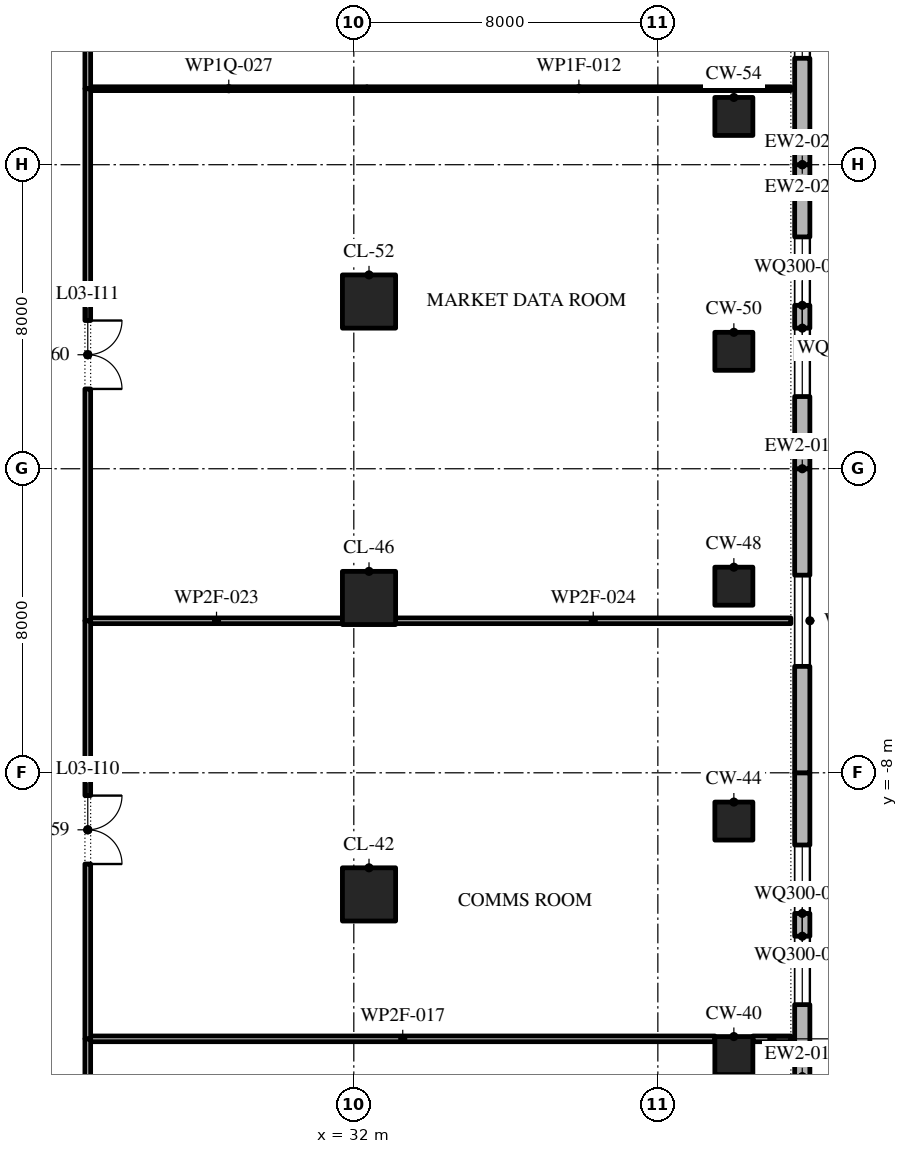
"""IFC4 building model, lengths in metres.
Left out: names, types, materials, properties, quantities, classifications, styles, units other than length and angle.
Written with IfcOpenShell. Run it as: python <this file> out.ifc"""

import sys

from ifc_helpers import new_model, si_unit, direction, frame, frame_2d, origin, origin_2d, place, context, subcontext, project, spatial, polyline, rectangle, outline, extrude, element, fill, save


model = new_model("IFC4")
c1 = context("Model", 3, precision=1e-05, world=origin(), true_north=direction((0.0, 1.0)))
c2 = subcontext(c1, "Body", "Model", "MODEL_VIEW")
j1 = project(units=[si_unit("LENGTHUNIT", "METRE"), si_unit("PLANEANGLEUNIT", "RADIAN")], contexts=[c1])
p1 = place(None, origin())
s1 = spatial("IfcSite", under=j1, at=p1, CompositionType="ELEMENT")
p2 = place(p1, origin())
s2 = spatial("IfcBuilding", under=s1, at=p2, CompositionType="ELEMENT")
p3 = place(p2, frame((0.0, 0.0, 19.2)))
s3 = spatial("IfcBuildingStorey", under=s2, at=p3, CompositionType="ELEMENT", Elevation=19.2)
p4 = place(p3, frame((42.0, -15.44, 0.0), z_axis=(0.0, 0.0, 1.0), x_axis=(1.0, 0.0, 0.0)))
e1 = element("IfcColumn", 1, at=p4, inside=s3, PredefinedType="COLUMN", context=c2, shape_type="SweptSolid", body=[
    extrude(rectangle(XDim=1.0, YDim=1.0, at=origin_2d()), origin(), (0.0, 0.0, 1.0), 4.8),
])
p5 = place(p3, frame((32.4, -11.2, 0.0), z_axis=(0.0, 0.0, 1.0), x_axis=(1.0, 0.0, 0.0)))
e2 = element("IfcColumn", 2, at=p5, inside=s3, PredefinedType="COLUMN", context=c2, shape_type="SweptSolid", body=[
    extrude(rectangle(XDim=1.4, YDim=1.4, at=origin_2d()), origin(), (0.0, 0.0, 1.0), 4.8),
])
p6 = place(p3, frame((42.0, -9.27, 0.0), z_axis=(0.0, 0.0, 1.0), x_axis=(1.0, 0.0, 0.0)))
e3 = element("IfcColumn", 3, at=p6, inside=s3, PredefinedType="COLUMN", context=c2, shape_type="SweptSolid", body=[
    extrude(rectangle(XDim=1.0, YDim=1.0, at=origin_2d()), origin(), (0.0, 0.0, 1.0), 4.8),
])
p7 = place(p3, frame((32.4, -3.4, 0.0), z_axis=(0.0, 0.0, 1.0), x_axis=(1.0, 0.0, 0.0)))
e4 = element("IfcColumn", 4, at=p7, inside=s3, PredefinedType="COLUMN", context=c2, shape_type="SweptSolid", body=[
    extrude(rectangle(XDim=1.4, YDim=1.4, at=origin_2d()), origin(), (0.0, 0.0, 1.0), 4.8),
])
for number, where, z_axis, x_axis in (
    (5, (42.0, -3.09, 0.0), (0.0, 0.0, 1.0), (1.0, 0.0, 0.0)),
    (6, (42.0, 3.09, 0.0), (0.0, 0.0, 1.0), (1.0, 0.0, 0.0)),
):
    element("IfcColumn", number, at=place(p3, frame(where, z_axis=z_axis, x_axis=x_axis)), inside=s3, PredefinedType="COLUMN", context=c2, shape_type="SweptSolid", body=[
        extrude(rectangle(XDim=1.0, YDim=1.0, at=origin_2d()), origin(), (0.0, 0.0, 1.0), 4.8),
    ])
p8 = place(p3, frame((32.4, 4.4, 0.0), z_axis=(0.0, 0.0, 1.0), x_axis=(1.0, 0.0, 0.0)))
e7 = element("IfcColumn", 7, at=p8, inside=s3, PredefinedType="COLUMN", context=c2, shape_type="SweptSolid", body=[
    extrude(rectangle(XDim=1.4, YDim=1.4, at=origin_2d()), origin(), (0.0, 0.0, 1.0), 4.8),
])
p9 = place(p3, frame((42.0, 9.27, 0.0), z_axis=(0.0, 0.0, 1.0), x_axis=(1.0, 0.0, 0.0)))
e8 = element("IfcColumn", 8, at=p9, inside=s3, PredefinedType="COLUMN", context=c2, shape_type="SweptSolid", body=[
    extrude(rectangle(XDim=1.0, YDim=1.0, at=origin_2d()), origin(), (0.0, 0.0, 1.0), 4.8),
])
p10 = place(p3, frame((43.8, -16.0, 0.0), z_axis=(0.0, 0.0, 1.0), x_axis=(0.0, 1.0, 0.0)))
e9 = element("IfcWall", 9, at=p10, inside=s3, PredefinedType="STANDARD", context=c2, shape_type="SweptSolid", body=[
    extrude(rectangle(XDim=8.0, YDim=0.4, at=frame_2d((4.0, 0.0))), origin(), (0.0, 0.0, 1.0), 4.5),
])
p11 = place(p10, frame((1.9, 0.0, 0.9)))
e10 = element("IfcOpeningElement", 10, at=p11, cuts=e9, PredefinedType="OPENING", context=c2, shape_type="SweptSolid", body=[
    extrude(outline(polyline([(0.0, 0.0), (1.8, 0.0), (1.8, 1.5), (1.785, 1.729), (1.738, 1.954), (1.662, 2.17), (1.558, 2.375), (1.427, 2.563), (1.271, 2.732), (1.095, 2.879), (0.9, 3.0), (0.705, 2.879), (0.529, 2.732), (0.373, 2.563), (0.242, 2.375), (0.138, 2.17), (0.062, 1.954), (0.015, 1.729), (0.0, 1.5), (0.0, 0.0)])), frame((0.0, 0.21, 0.0), z_axis=(0.0, -1.0, 0.0), x_axis=(1.0, 0.0, 0.0)), (0.0, 0.0, 1.0), 0.42),
])
p12 = place(p10, frame((4.3, 0.0, 0.9)))
e11 = element("IfcOpeningElement", 11, at=p12, cuts=e9, PredefinedType="OPENING", context=c2, shape_type="SweptSolid", body=[
    extrude(outline(polyline([(0.0, 0.0), (1.8, 0.0), (1.8, 1.5), (1.785, 1.729), (1.738, 1.954), (1.662, 2.17), (1.558, 2.375), (1.427, 2.563), (1.271, 2.732), (1.095, 2.879), (0.9, 3.0), (0.705, 2.879), (0.529, 2.732), (0.373, 2.563), (0.242, 2.375), (0.138, 2.17), (0.062, 1.954), (0.015, 1.729), (0.0, 1.5), (0.0, 0.0)])), frame((0.0, 0.21, 0.0), z_axis=(0.0, -1.0, 0.0), x_axis=(1.0, 0.0, 0.0)), (0.0, 0.0, 1.0), 0.42),
])
p13 = place(p3, frame((43.8, -8.0, 0.0), z_axis=(0.0, 0.0, 1.0), x_axis=(0.0, 1.0, 0.0)))
e12 = element("IfcWall", 12, at=p13, inside=s3, PredefinedType="STANDARD", context=c2, shape_type="SweptSolid", body=[
    extrude(rectangle(XDim=8.0, YDim=0.4, at=frame_2d((4.0, 0.0))), origin(), (0.0, 0.0, 1.0), 4.5),
])
p14 = place(p13, frame((2.8, 0.0, 0.9)))
e13 = element("IfcOpeningElement", 13, at=p14, cuts=e12, PredefinedType="OPENING", context=c2, shape_type="SweptSolid", body=[
    extrude(outline(polyline([(0.0, 0.0), (2.4, 0.0), (2.4, 1.5), (2.378, 1.758), (2.313, 2.009), (2.207, 2.245), (2.063, 2.46), (1.885, 2.648), (1.677, 2.804), (1.447, 2.922), (1.2, 3.0), (0.953, 2.922), (0.722, 2.804), (0.515, 2.648), (0.337, 2.46), (0.193, 2.245), (0.087, 2.009), (0.022, 1.758), (0.0, 1.5), (0.0, 0.0)])), frame((0.0, 0.21, 0.0), z_axis=(0.0, -1.0, 0.0), x_axis=(1.0, 0.0, 0.0)), (0.0, 0.0, 1.0), 0.42),
])
p15 = place(p3, frame((43.8, 0.0, 0.0), z_axis=(0.0, 0.0, 1.0), x_axis=(0.0, 1.0, 0.0)))
e14 = element("IfcWall", 14, at=p15, inside=s3, PredefinedType="STANDARD", context=c2, shape_type="SweptSolid", body=[
    extrude(rectangle(XDim=8.0, YDim=0.4, at=frame_2d((4.0, 0.0))), origin(), (0.0, 0.0, 1.0), 4.5),
])
p16 = place(p15, frame((1.9, 0.0, 0.9)))
e15 = element("IfcOpeningElement", 15, at=p16, cuts=e14, PredefinedType="OPENING", context=c2, shape_type="SweptSolid", body=[
    extrude(outline(polyline([(0.0, 0.0), (1.8, 0.0), (1.8, 1.5), (1.785, 1.729), (1.738, 1.954), (1.662, 2.17), (1.558, 2.375), (1.427, 2.563), (1.271, 2.732), (1.095, 2.879), (0.9, 3.0), (0.705, 2.879), (0.529, 2.732), (0.373, 2.563), (0.242, 2.375), (0.138, 2.17), (0.062, 1.954), (0.015, 1.729), (0.0, 1.5), (0.0, 0.0)])), frame((0.0, 0.21, 0.0), z_axis=(0.0, -1.0, 0.0), x_axis=(1.0, 0.0, 0.0)), (0.0, 0.0, 1.0), 0.42),
])
p17 = place(p15, frame((4.3, 0.0, 0.9)))
e16 = element("IfcOpeningElement", 16, at=p17, cuts=e14, PredefinedType="OPENING", context=c2, shape_type="SweptSolid", body=[
    extrude(outline(polyline([(0.0, 0.0), (1.8, 0.0), (1.8, 1.5), (1.785, 1.729), (1.738, 1.954), (1.662, 2.17), (1.558, 2.375), (1.427, 2.563), (1.271, 2.732), (1.095, 2.879), (0.9, 3.0), (0.705, 2.879), (0.529, 2.732), (0.373, 2.563), (0.242, 2.375), (0.138, 2.17), (0.062, 1.954), (0.015, 1.729), (0.0, 1.5), (0.0, 0.0)])), frame((0.0, 0.21, 0.0), z_axis=(0.0, -1.0, 0.0), x_axis=(1.0, 0.0, 0.0)), (0.0, 0.0, 1.0), 0.42),
])
p18 = place(p3, frame((43.8, 8.0, 0.0), z_axis=(0.0, 0.0, 1.0), x_axis=(0.0, 1.0, 0.0)))
e17 = element("IfcWall", 17, at=p18, inside=s3, PredefinedType="STANDARD", context=c2, shape_type="SweptSolid", body=[
    extrude(rectangle(XDim=8.0, YDim=0.4, at=frame_2d((4.0, 0.0))), origin(), (0.0, 0.0, 1.0), 4.5),
])
p19 = place(p18, frame((2.8, 0.0, 0.9)))
e18 = element("IfcOpeningElement", 18, at=p19, cuts=e17, PredefinedType="OPENING", context=c2, shape_type="SweptSolid", body=[
    extrude(outline(polyline([(0.0, 0.0), (2.4, 0.0), (2.4, 1.5), (2.378, 1.758), (2.313, 2.009), (2.207, 2.245), (2.063, 2.46), (1.885, 2.648), (1.677, 2.804), (1.447, 2.922), (1.2, 3.0), (0.953, 2.922), (0.722, 2.804), (0.515, 2.648), (0.337, 2.46), (0.193, 2.245), (0.087, 2.009), (0.022, 1.758), (0.0, 1.5), (0.0, 0.0)])), frame((0.0, 0.21, 0.0), z_axis=(0.0, -1.0, 0.0), x_axis=(1.0, 0.0, 0.0)), (0.0, 0.0, 1.0), 0.42),
])
p20 = place(p3, frame((25.075, -15.0, 0.0), z_axis=(0.0, 0.0, 1.0), x_axis=(1.0, 0.0, 0.0)))
e19 = element("IfcWall", 19, at=p20, inside=s3, PredefinedType="PARTITIONING", context=c2, shape_type="SweptSolid", body=[
    extrude(rectangle(XDim=16.425, YDim=0.15, at=frame_2d((8.212, 0.0))), origin(), (0.0, 0.0, 1.0), 4.5),
])
p21 = place(p3, frame((42.5, -15.0, 0.0), z_axis=(0.0, 0.0, 1.0), x_axis=(1.0, 0.0, 0.0)))
e20 = element("IfcWall", 20, at=p21, inside=s3, PredefinedType="PARTITIONING", context=c2, shape_type="SweptSolid", body=[
    extrude(rectangle(XDim=1.0, YDim=0.15, at=frame_2d((0.5, 0.0))), origin(), (0.0, 0.0, 1.0), 4.5),
])
p22 = place(p3, frame((25.075, -4.0, 0.0), z_axis=(0.0, 0.0, 1.0), x_axis=(1.0, 0.0, 0.0)))
e21 = element("IfcWall", 21, at=p22, inside=s3, PredefinedType="PARTITIONING", context=c2, shape_type="SweptSolid", body=[
    extrude(rectangle(XDim=6.625, YDim=0.15, at=frame_2d((3.312, 0.0))), origin(), (0.0, 0.0, 1.0), 4.5),
])
p23 = place(p3, frame((33.1, -4.0, 0.0), z_axis=(0.0, 0.0, 1.0), x_axis=(1.0, 0.0, 0.0)))
e22 = element("IfcWall", 22, at=p23, inside=s3, PredefinedType="PARTITIONING", context=c2, shape_type="SweptSolid", body=[
    extrude(rectangle(XDim=10.4, YDim=0.15, at=frame_2d((5.2, 0.0))), origin(), (0.0, 0.0, 1.0), 4.5),
])
p24 = place(p3, frame((25.075, 10.0, 0.0), z_axis=(0.0, 0.0, 1.0), x_axis=(1.0, 0.0, 0.0)))
e23 = element("IfcWall", 23, at=p24, inside=s3, PredefinedType="PARTITIONING", context=c2, shape_type="SweptSolid", body=[
    extrude(rectangle(XDim=7.27, YDim=0.1, at=frame_2d((3.635, 0.0))), origin(), (0.0, 0.0, 1.0), 3.964),
])
p25 = place(p3, frame((25.0, -28.575, 0.0), z_axis=(0.0, 0.0, 1.0), x_axis=(0.0, 1.0, 0.0)))
e24 = element("IfcWall", 24, at=p25, inside=s3, PredefinedType="PARTITIONING", context=c2, shape_type="SweptSolid", body=[
    extrude(rectangle(XDim=13.575, YDim=0.15, at=frame_2d((6.788, 0.0))), origin(), (0.0, 0.0, 1.0), 4.5),
])
p26 = place(p25, frame((5.887, 0.0, 0.0)))
e25 = element("IfcOpeningElement", 25, at=p26, cuts=e24, PredefinedType="OPENING", context=c2, shape_type="SweptSolid", body=[
    extrude(rectangle(XDim=1.8, YDim=2.1, at=frame_2d((0.9, 1.05))), frame((0.0, 0.085, 0.0), z_axis=(0.0, -1.0, 0.0), x_axis=(1.0, 0.0, 0.0)), (0.0, 0.0, 1.0), 0.17),
])
p27 = place(p3, frame((25.0, -15.0, 0.0), z_axis=(0.0, 0.0, 1.0), x_axis=(0.0, 1.0, 0.0)))
e26 = element("IfcWall", 26, at=p27, inside=s3, PredefinedType="PARTITIONING", context=c2, shape_type="SweptSolid", body=[
    extrude(rectangle(XDim=11.0, YDim=0.15, at=frame_2d((5.5, 0.0))), origin(), (0.0, 0.0, 1.0), 4.5),
])
p28 = place(p27, frame((4.6, 0.0, 0.0)))
e27 = element("IfcOpeningElement", 27, at=p28, cuts=e26, PredefinedType="OPENING", context=c2, shape_type="SweptSolid", body=[
    extrude(rectangle(XDim=1.8, YDim=2.1, at=frame_2d((0.9, 1.05))), frame((0.0, 0.085, 0.0), z_axis=(0.0, -1.0, 0.0), x_axis=(1.0, 0.0, 0.0)), (0.0, 0.0, 1.0), 0.17),
])
p29 = place(p3, frame((25.0, -4.0, 0.0), z_axis=(0.0, 0.0, 1.0), x_axis=(0.0, 1.0, 0.0)))
e28 = element("IfcWall", 28, at=p29, inside=s3, PredefinedType="PARTITIONING", context=c2, shape_type="SweptSolid", body=[
    extrude(rectangle(XDim=14.0, YDim=0.15, at=frame_2d((7.0, 0.0))), origin(), (0.0, 0.0, 1.0), 4.5),
])
p30 = place(p29, frame((6.1, 0.0, 0.0)))
e29 = element("IfcOpeningElement", 29, at=p30, cuts=e28, PredefinedType="OPENING", context=c2, shape_type="SweptSolid", body=[
    extrude(rectangle(XDim=1.8, YDim=2.1, at=frame_2d((0.9, 1.05))), frame((0.0, 0.085, 0.0), z_axis=(0.0, -1.0, 0.0), x_axis=(1.0, 0.0, 0.0)), (0.0, 0.0, 1.0), 0.17),
])
p31 = place(p3, frame((25.0, 10.0, 0.0), z_axis=(0.0, 0.0, 1.0), x_axis=(0.0, 1.0, 0.0)))
e30 = element("IfcWall", 30, at=p31, inside=s3, PredefinedType="PARTITIONING", context=c2, shape_type="SweptSolid", body=[
    extrude(rectangle(XDim=12.0, YDim=0.15, at=frame_2d((6.0, 0.0))), origin(), (0.0, 0.0, 1.0), 4.5),
])
p32 = place(p31, frame((5.1, 0.0, 0.0)))
e31 = element("IfcOpeningElement", 31, at=p32, cuts=e30, PredefinedType="OPENING", context=c2, shape_type="SweptSolid", body=[
    extrude(rectangle(XDim=1.8, YDim=2.1, at=frame_2d((0.9, 1.05))), frame((0.0, 0.085, 0.0), z_axis=(0.0, -1.0, 0.0), x_axis=(1.0, 0.0, 0.0)), (0.0, 0.0, 1.0), 0.17),
])
p33 = place(p3, frame((32.345, 10.0, 0.0), z_axis=(0.0, 0.0, 1.0), x_axis=(1.0, 0.0, 0.0)))
e32 = element("IfcWall", 32, at=p33, inside=s3, PredefinedType="PARTITIONING", context=c2, shape_type="SweptSolid", body=[
    extrude(rectangle(XDim=11.155, YDim=0.1, at=frame_2d((5.578, 0.0))), origin(), (0.0, 0.0, 1.0), 4.5),
])
p34 = place(p11, origin())
e33 = element("IfcWindow", 33, at=p34, inside=s3, PartitioningType="DOUBLE_PANEL_VERTICAL", PredefinedType="WINDOW", context=c2, shape_type="SweptSolid", body=[
    extrude(outline(polyline([(0.0, 0.0), (1.8, 0.0), (1.8, 1.5), (1.785, 1.729), (1.738, 1.954), (1.662, 2.17), (1.558, 2.375), (1.427, 2.563), (1.271, 2.732), (1.095, 2.879), (0.9, 3.0), (0.705, 2.879), (0.529, 2.732), (0.373, 2.563), (0.242, 2.375), (0.138, 2.17), (0.062, 1.954), (0.015, 1.729), (0.0, 1.5), (0.0, 0.0)])), frame((0.0, 0.03, 0.0), z_axis=(0.0, -1.0, 0.0), x_axis=(1.0, 0.0, 0.0)), (0.0, 0.0, 1.0), 0.06),
])
fill(e10, e33)
p35 = place(p12, origin())
e34 = element("IfcWindow", 34, at=p35, inside=s3, PartitioningType="DOUBLE_PANEL_VERTICAL", PredefinedType="WINDOW", context=c2, shape_type="SweptSolid", body=[
    extrude(outline(polyline([(0.0, 0.0), (1.8, 0.0), (1.8, 1.5), (1.785, 1.729), (1.738, 1.954), (1.662, 2.17), (1.558, 2.375), (1.427, 2.563), (1.271, 2.732), (1.095, 2.879), (0.9, 3.0), (0.705, 2.879), (0.529, 2.732), (0.373, 2.563), (0.242, 2.375), (0.138, 2.17), (0.062, 1.954), (0.015, 1.729), (0.0, 1.5), (0.0, 0.0)])), frame((0.0, 0.03, 0.0), z_axis=(0.0, -1.0, 0.0), x_axis=(1.0, 0.0, 0.0)), (0.0, 0.0, 1.0), 0.06),
])
fill(e11, e34)
p36 = place(p14, origin())
e35 = element("IfcWindow", 35, at=p36, inside=s3, PartitioningType="DOUBLE_PANEL_VERTICAL", PredefinedType="WINDOW", context=c2, shape_type="SweptSolid", body=[
    extrude(outline(polyline([(0.0, 0.0), (2.4, 0.0), (2.4, 1.5), (2.378, 1.758), (2.313, 2.009), (2.207, 2.245), (2.063, 2.46), (1.885, 2.648), (1.677, 2.804), (1.447, 2.922), (1.2, 3.0), (0.953, 2.922), (0.722, 2.804), (0.515, 2.648), (0.337, 2.46), (0.193, 2.245), (0.087, 2.009), (0.022, 1.758), (0.0, 1.5), (0.0, 0.0)])), frame((0.0, 0.03, 0.0), z_axis=(0.0, -1.0, 0.0), x_axis=(1.0, 0.0, 0.0)), (0.0, 0.0, 1.0), 0.06),
])
fill(e13, e35)
p37 = place(p16, origin())
e36 = element("IfcWindow", 36, at=p37, inside=s3, PartitioningType="DOUBLE_PANEL_VERTICAL", PredefinedType="WINDOW", context=c2, shape_type="SweptSolid", body=[
    extrude(outline(polyline([(0.0, 0.0), (1.8, 0.0), (1.8, 1.5), (1.785, 1.729), (1.738, 1.954), (1.662, 2.17), (1.558, 2.375), (1.427, 2.563), (1.271, 2.732), (1.095, 2.879), (0.9, 3.0), (0.705, 2.879), (0.529, 2.732), (0.373, 2.563), (0.242, 2.375), (0.138, 2.17), (0.062, 1.954), (0.015, 1.729), (0.0, 1.5), (0.0, 0.0)])), frame((0.0, 0.03, 0.0), z_axis=(0.0, -1.0, 0.0), x_axis=(1.0, 0.0, 0.0)), (0.0, 0.0, 1.0), 0.06),
])
fill(e15, e36)
p38 = place(p17, origin())
e37 = element("IfcWindow", 37, at=p38, inside=s3, PartitioningType="DOUBLE_PANEL_VERTICAL", PredefinedType="WINDOW", context=c2, shape_type="SweptSolid", body=[
    extrude(outline(polyline([(0.0, 0.0), (1.8, 0.0), (1.8, 1.5), (1.785, 1.729), (1.738, 1.954), (1.662, 2.17), (1.558, 2.375), (1.427, 2.563), (1.271, 2.732), (1.095, 2.879), (0.9, 3.0), (0.705, 2.879), (0.529, 2.732), (0.373, 2.563), (0.242, 2.375), (0.138, 2.17), (0.062, 1.954), (0.015, 1.729), (0.0, 1.5), (0.0, 0.0)])), frame((0.0, 0.03, 0.0), z_axis=(0.0, -1.0, 0.0), x_axis=(1.0, 0.0, 0.0)), (0.0, 0.0, 1.0), 0.06),
])
fill(e16, e37)
p39 = place(p19, origin())
e38 = element("IfcWindow", 38, at=p39, inside=s3, PartitioningType="DOUBLE_PANEL_VERTICAL", PredefinedType="WINDOW", context=c2, shape_type="SweptSolid", body=[
    extrude(outline(polyline([(0.0, 0.0), (2.4, 0.0), (2.4, 1.5), (2.378, 1.758), (2.313, 2.009), (2.207, 2.245), (2.063, 2.46), (1.885, 2.648), (1.677, 2.804), (1.447, 2.922), (1.2, 3.0), (0.953, 2.922), (0.722, 2.804), (0.515, 2.648), (0.337, 2.46), (0.193, 2.245), (0.087, 2.009), (0.022, 1.758), (0.0, 1.5), (0.0, 0.0)])), frame((0.0, 0.03, 0.0), z_axis=(0.0, -1.0, 0.0), x_axis=(1.0, 0.0, 0.0)), (0.0, 0.0, 1.0), 0.06),
])
fill(e18, e38)
p40 = place(p28, frame((1.8, 0.0, 0.0), z_axis=(0.0, 0.0, 1.0), x_axis=(-1.0, 0.0, 0.0)))
e39 = element("IfcDoor", 39, at=p40, inside=s3, OperationType="SINGLE_SWING_LEFT", PredefinedType="DOOR", context=c2, shape_type="SweptSolid", body=[
    extrude(rectangle(XDim=1.8, YDim=2.1, at=frame_2d((0.9, 1.05))), frame((0.0, 0.025, 0.0), z_axis=(0.0, -1.0, 0.0), x_axis=(1.0, 0.0, 0.0)), (0.0, 0.0, 1.0), 0.05),
])
fill(e27, e39)
p41 = place(p30, frame((1.8, 0.0, 0.0), z_axis=(0.0, 0.0, 1.0), x_axis=(-1.0, 0.0, 0.0)))
e40 = element("IfcDoor", 40, at=p41, inside=s3, OperationType="SINGLE_SWING_LEFT", PredefinedType="DOOR", context=c2, shape_type="SweptSolid", body=[
    extrude(rectangle(XDim=1.8, YDim=2.1, at=frame_2d((0.9, 1.05))), frame((0.0, 0.025, 0.0), z_axis=(0.0, -1.0, 0.0), x_axis=(1.0, 0.0, 0.0)), (0.0, 0.0, 1.0), 0.05),
])
fill(e29, e40)
save(model, sys.argv[1])
